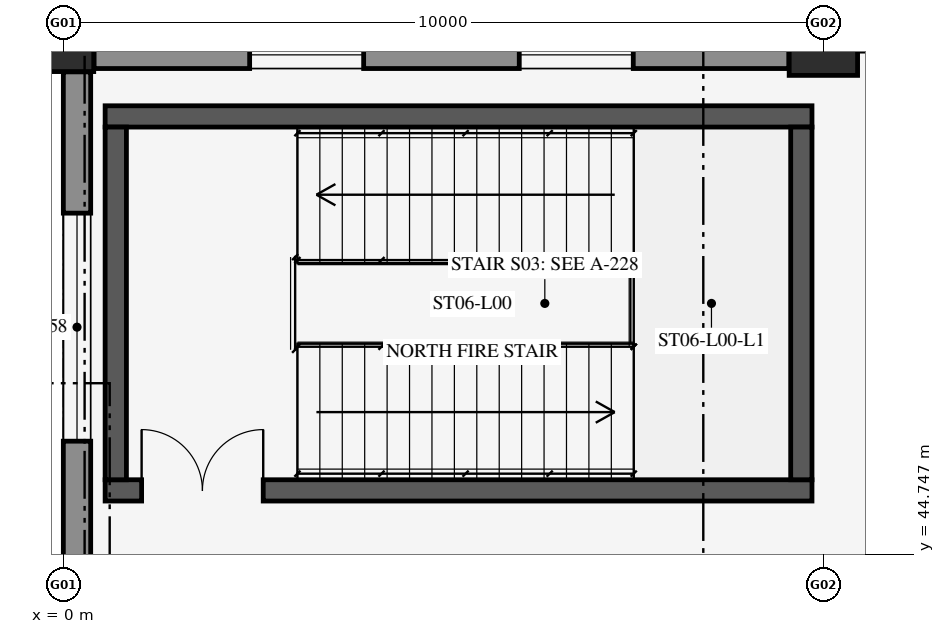
"""IFC4 building model, lengths in metres.
Left out: names, types, materials, properties, quantities, classifications, styles, units other than length and angle.
Written with IfcOpenShell. Run it as: python <this file> out.ifc"""

import sys

from ifc_helpers import new_model, si_unit, direction, frame, frame_2d, origin, origin_2d, place, context, subcontext, project, spatial, rectangle, extrude, element, fill, save


model = new_model("IFC4")
c1 = context("Model", 3, precision=1e-05, world=origin(), true_north=direction((0.0, 1.0)))
c2 = subcontext(c1, "Body", "Model", "MODEL_VIEW")
j1 = project(units=[si_unit("LENGTHUNIT", "METRE"), si_unit("PLANEANGLEUNIT", "RADIAN")], contexts=[c1])
p1 = place(None, origin())
s1 = spatial("IfcSite", under=j1, at=p1, CompositionType="ELEMENT")
p2 = place(p1, origin())
s2 = spatial("IfcBuilding", under=s1, at=p2, CompositionType="ELEMENT")
p3 = place(p2, origin())
s3 = spatial("IfcBuildingStorey", under=s2, at=p3, CompositionType="ELEMENT", Elevation=0.0)
p4 = place(p3, frame((0.55, 45.59, 0.0), z_axis=(0.0, 0.0, 1.0), x_axis=(1.0, 0.0, 0.0)))
e1 = element("IfcWall", 1, at=p4, inside=s3, PredefinedType="SHEAR", context=c2, shape_type="SweptSolid", body=[
    extrude(rectangle(XDim=9.3, YDim=0.28, at=frame_2d((4.65, 0.0))), origin(), (0.0, 0.0, 1.0), 5.16),
])
p5 = place(p4, frame((0.48, 0.0, 0.0)))
e2 = element("IfcOpeningElement", 2, at=p5, cuts=e1, PredefinedType="OPENING", context=c2, shape_type="SweptSolid", body=[
    extrude(rectangle(XDim=1.6, YDim=2.2, at=frame_2d((0.8, 1.1))), frame((0.0, 0.152, 0.0), z_axis=(0.0, -1.0, 0.0), x_axis=(1.0, 0.0, 0.0)), (0.0, 0.0, 1.0), 0.304),
])
p6 = place(p3, frame((0.55, 50.51, 0.0), z_axis=(0.0, 0.0, 1.0), x_axis=(1.0, 0.0, 0.0)))
e3 = element("IfcWall", 3, at=p6, inside=s3, PredefinedType="SHEAR", context=c2, shape_type="SweptSolid", body=[
    extrude(rectangle(XDim=9.3, YDim=0.28, at=frame_2d((4.65, 0.0))), origin(), (0.0, 0.0, 1.0), 5.16),
])
for number, where, z_axis, x_axis in (
    (4, (0.69, 45.73, 0.0), (0.0, 0.0, 1.0), (0.0, 1.0, 0.0)),
    (5, (9.71, 45.73, 0.0), (0.0, 0.0, 1.0), (0.0, 1.0, 0.0)),
):
    element("IfcWall", number, at=place(p3, frame(where, z_axis=z_axis, x_axis=x_axis)), inside=s3, PredefinedType="SHEAR", context=c2, shape_type="SweptSolid", body=[
        extrude(rectangle(XDim=4.64, YDim=0.28, at=frame_2d((2.32, 0.0))), origin(), (0.0, 0.0, 1.0), 5.16),
    ])
p7 = place(p3, frame((0.0, 51.5, 0.0), z_axis=(0.0, 0.0, 1.0), x_axis=(1.0, 0.0, 0.0)))
e6 = element("IfcColumn", 6, at=p7, inside=s3, PredefinedType="COLUMN", context=c2, shape_type="SweptSolid", body=[
    extrude(rectangle(XDim=0.8, YDim=0.8, at=origin_2d()), origin(), (0.0, 0.0, 1.0), 5.4),
])
p8 = place(p3, frame((10.0, 51.5, 0.0), z_axis=(0.0, 0.0, 1.0), x_axis=(1.0, 0.0, 0.0)))
e7 = element("IfcColumn", 7, at=p8, inside=s3, PredefinedType="COLUMN", context=c2, shape_type="SweptSolid", body=[
    extrude(rectangle(XDim=0.9, YDim=0.9, at=origin_2d()), origin(), (0.0, 0.0, 1.0), 5.4),
])
p9 = place(p3, frame((0.404, 51.32, 0.0), z_axis=(0.0, 0.0, 1.0), x_axis=(1.0, 0.0, 0.0)))
e8 = element("IfcWall", 8, at=p9, inside=s3, PredefinedType="SOLIDWALL", context=c2, shape_type="SweptSolid", body=[
    extrude(rectangle(XDim=9.142, YDim=0.36, at=frame_2d((4.571, 0.0))), origin(), (0.0, 0.0, 1.0), 4.518),
])
p10 = place(p9, frame((2.047, 0.0, 0.95)))
e9 = element("IfcOpeningElement", 9, at=p10, cuts=e8, PredefinedType="OPENING", context=c2, shape_type="SweptSolid", body=[
    extrude(rectangle(XDim=1.5, YDim=1.2, at=frame_2d((0.75, 0.6))), frame((0.0, 0.192, 0.0), z_axis=(0.0, -1.0, 0.0), x_axis=(1.0, 0.0, 0.0)), (0.0, 0.0, 1.0), 0.384),
])
p11 = place(p9, frame((5.595, 0.0, 0.95)))
e10 = element("IfcOpeningElement", 10, at=p11, cuts=e8, PredefinedType="OPENING", context=c2, shape_type="SweptSolid", body=[
    extrude(rectangle(XDim=1.5, YDim=1.2, at=frame_2d((0.75, 0.6))), frame((0.0, 0.192, 0.0), z_axis=(0.0, -1.0, 0.0), x_axis=(1.0, 0.0, 0.0)), (0.0, 0.0, 1.0), 0.384),
])
p12 = place(p3, frame((0.18, 44.379, 0.0), z_axis=(0.0, 0.0, 1.0), x_axis=(0.0, 1.0, 0.0)))
e11 = element("IfcWall", 11, at=p12, inside=s3, PredefinedType="SOLIDWALL", context=c2, shape_type="SweptSolid", body=[
    extrude(rectangle(XDim=6.717, YDim=0.36, at=frame_2d((3.358, 0.0))), origin(), (0.0, 0.0, 1.0), 4.518),
])
p13 = place(p12, frame((1.858, 0.0, 0.95)))
e12 = element("IfcOpeningElement", 12, at=p13, cuts=e11, PredefinedType="OPENING", context=c2, shape_type="SweptSolid", body=[
    extrude(rectangle(XDim=3.0, YDim=2.1, at=frame_2d((1.5, 1.05))), frame((0.0, 0.192, 0.0), z_axis=(0.0, -1.0, 0.0), x_axis=(1.0, 0.0, 0.0)), (0.0, 0.0, 1.0), 0.384),
])
p14 = place(p5, frame((1.6, 0.0, 0.0), z_axis=(0.0, 0.0, 1.0), x_axis=(-1.0, 0.0, 0.0)))
e13 = element("IfcDoor", 13, at=p14, inside=s3, OperationType="DOUBLE_DOOR_SINGLE_SWING", PredefinedType="DOOR", context=c2, shape_type="SweptSolid", body=[
    extrude(rectangle(XDim=1.6, YDim=2.2, at=frame_2d((0.8, 1.1))), frame((0.0, 0.025, 0.0), z_axis=(0.0, -1.0, 0.0), x_axis=(1.0, 0.0, 0.0)), (0.0, 0.0, 1.0), 0.05),
])
fill(e2, e13)
p15 = place(p10, origin())
e14 = element("IfcWindow", 14, at=p15, inside=s3, PartitioningType="SINGLE_PANEL", PredefinedType="WINDOW", context=c2, shape_type="SweptSolid", body=[
    extrude(rectangle(XDim=1.5, YDim=1.2, at=frame_2d((0.75, 0.6))), frame((0.0, 0.03, 0.0), z_axis=(0.0, -1.0, 0.0), x_axis=(1.0, 0.0, 0.0)), (0.0, 0.0, 1.0), 0.06),
])
fill(e9, e14)
p16 = place(p11, origin())
e15 = element("IfcWindow", 15, at=p16, inside=s3, PartitioningType="SINGLE_PANEL", PredefinedType="WINDOW", context=c2, shape_type="SweptSolid", body=[
    extrude(rectangle(XDim=1.5, YDim=1.2, at=frame_2d((0.75, 0.6))), frame((0.0, 0.03, 0.0), z_axis=(0.0, -1.0, 0.0), x_axis=(1.0, 0.0, 0.0)), (0.0, 0.0, 1.0), 0.06),
])
fill(e10, e15)
p17 = place(p13, origin())
e16 = element("IfcWindow", 16, at=p17, inside=s3, PartitioningType="SINGLE_PANEL", PredefinedType="WINDOW", context=c2, shape_type="SweptSolid", body=[
    extrude(rectangle(XDim=3.0, YDim=2.1, at=frame_2d((1.5, 1.05))), frame((0.0, 0.03, 0.0), z_axis=(0.0, -1.0, 0.0), x_axis=(1.0, 0.0, 0.0)), (0.0, 0.0, 1.0), 0.06),
])
fill(e12, e16)
save(model, sys.argv[1])
